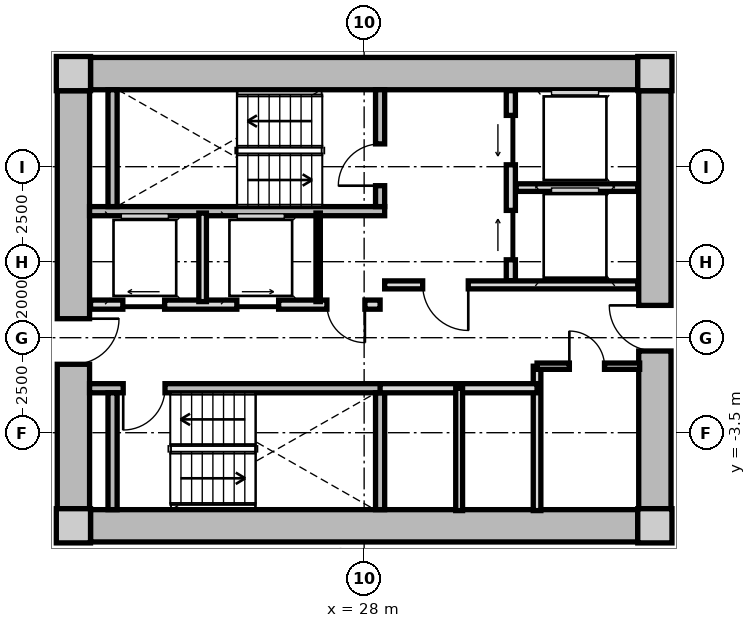
"""IFC4 building model, lengths in metres.
Left out: names, types, materials, properties, quantities, classifications, styles, units other than length and angle.
Written with IfcOpenShell. Run it as: python <this file> out.ifc"""

import sys

from ifc_helpers import new_model, si_unit, direction, frame, frame_2d, origin, origin_2d, place, context, subcontext, project, spatial, rectangle, extrude, source, transform, mapped, element, fill, save


model = new_model("IFC4")
c1 = context("Model", 3, precision=1e-05, world=origin(), true_north=direction((0.0, 1.0)))
c2 = subcontext(c1, "Body", "Model", "MODEL_VIEW")
j1 = project(units=[si_unit("LENGTHUNIT", "METRE"), si_unit("PLANEANGLEUNIT", "RADIAN")], contexts=[c1])
p1 = place(None, origin())
s1 = spatial("IfcSite", under=j1, at=p1, CompositionType="ELEMENT")
p2 = place(p1, origin())
s2 = spatial("IfcBuilding", under=s1, at=p2, CompositionType="ELEMENT")
p3 = place(p2, frame((0.0, 0.0, 24.65)))
s3 = spatial("IfcBuildingStorey", under=s2, at=p3, CompositionType="ELEMENT", Elevation=24.65)
m1 = source(origin(), c2, "Body", "SweptSolid", [
    extrude(rectangle(XDim=0.9, YDim=0.9, at=origin_2d()), origin(), (0.0, 0.0, 1.0), 3.05),
])
for number, where, z_axis, x_axis in (
    (1, (20.35, -5.95, 0.0), (0.0, 0.0, 1.0), (1.0, 0.0, 0.0)),
    (2, (35.65, -5.95, 0.0), (0.0, 0.0, 1.0), (1.0, 0.0, 0.0)),
    (3, (35.65, 5.95, 0.0), (0.0, 0.0, 1.0), (1.0, 0.0, 0.0)),
    (4, (20.35, 5.95, 0.0), (0.0, 0.0, 1.0), (1.0, 0.0, 0.0)),
):
    element("IfcColumn", number, at=place(p3, frame(where, z_axis=z_axis, x_axis=x_axis)), inside=s3, PredefinedType="COLUMN", context=c2, shape_type="MappedRepresentation", body=[
        mapped(m1, transform((0.0, 0.0, 0.0), x_axis=(1.0, 0.0, 0.0), y_axis=(0.0, 1.0, 0.0), z_axis=(0.0, 0.0, 1.0), scale=1.0)),
    ])
m2 = source(origin(), c2, "Body", "SweptSolid", [
    extrude(rectangle(XDim=14.4, YDim=0.85, at=frame_2d((7.2, 0.0))), origin(), (0.0, 0.0, 1.0), 2.79),
])
for number, where, z_axis, x_axis in (
    (5, (20.8, 5.95, 0.0), (0.0, 0.0, 1.0), (1.0, 0.0, 0.0)),
    (6, (35.2, -5.95, 0.0), (0.0, 0.0, 1.0), (-1.0, 0.0, 0.0)),
):
    element("IfcWall", number, at=place(p3, frame(where, z_axis=z_axis, x_axis=x_axis)), inside=s3, PredefinedType="SHEAR", context=c2, shape_type="MappedRepresentation", body=[
        mapped(m2, transform((0.0, 0.0, 0.0), x_axis=(1.0, 0.0, 0.0), y_axis=(0.0, 1.0, 0.0), z_axis=(0.0, 0.0, 1.0), scale=1.0)),
    ])
m3 = source(origin(), c2, "Body", "SweptSolid", [
    extrude(rectangle(XDim=11.0, YDim=0.85, at=frame_2d((5.5, 0.0))), origin(), (0.0, 0.0, 1.0), 2.79),
])
p4 = place(p3, frame((20.35, -5.5, 0.0), z_axis=(0.0, 0.0, 1.0), x_axis=(0.0, 1.0, 0.0)))
e7 = element("IfcWall", 7, at=p4, inside=s3, PredefinedType="SHEAR", context=c2, shape_type="MappedRepresentation", body=[
    mapped(m3, transform((0.0, 0.0, 0.0), x_axis=(1.0, 0.0, 0.0), y_axis=(0.0, 1.0, 0.0), z_axis=(0.0, 0.0, 1.0), scale=1.0)),
])
p5 = place(p4, frame((3.8, 0.0, 0.0)))
e8 = element("IfcOpeningElement", 8, at=p5, cuts=e7, PredefinedType="OPENING", context=c2, shape_type="SweptSolid", body=[
    extrude(rectangle(XDim=1.2, YDim=2.15, at=frame_2d((0.6, 1.075))), frame((0.0, 0.435, 0.0), z_axis=(0.0, -1.0, 0.0), x_axis=(1.0, 0.0, 0.0)), (0.0, 0.0, 1.0), 0.87),
])
p6 = place(p3, frame((35.65, 5.5, 0.0), z_axis=(0.0, 0.0, 1.0), x_axis=(0.0, -1.0, 0.0)))
e9 = element("IfcWall", 9, at=p6, inside=s3, PredefinedType="SHEAR", context=c2, shape_type="MappedRepresentation", body=[
    mapped(m3, transform((0.0, 0.0, 0.0), x_axis=(1.0, 0.0, 0.0), y_axis=(0.0, 1.0, 0.0), z_axis=(0.0, 0.0, 1.0), scale=1.0)),
])
p7 = place(p6, frame((5.65, 0.0, 0.0)))
e10 = element("IfcOpeningElement", 10, at=p7, cuts=e9, PredefinedType="OPENING", context=c2, shape_type="SweptSolid", body=[
    extrude(rectangle(XDim=1.2, YDim=2.15, at=frame_2d((0.6, 1.075))), frame((0.0, 0.435, 0.0), z_axis=(0.0, -1.0, 0.0), x_axis=(1.0, 0.0, 0.0)), (0.0, 0.0, 1.0), 0.87),
])
m4 = source(origin(), c2, "Body", "SweptSolid", [
    extrude(rectangle(XDim=7.765, YDim=0.24, at=frame_2d((3.883, 0.0))), origin(), (0.0, 0.0, 1.0), 2.79),
])
p8 = place(p3, frame((20.775, 2.33, 0.0), z_axis=(0.0, 0.0, 1.0), x_axis=(1.0, 0.0, 0.0)))
e11 = element("IfcWall", 11, at=p8, inside=s3, PredefinedType="PARTITIONING", context=c2, shape_type="MappedRepresentation", body=[
    mapped(m4, transform((0.0, 0.0, 0.0), x_axis=(1.0, 0.0, 0.0), y_axis=(0.0, 1.0, 0.0), z_axis=(0.0, 0.0, 1.0), scale=1.0)),
])
m5 = source(origin(), c2, "Body", "SweptSolid", [
    extrude(rectangle(XDim=3.075, YDim=0.24, at=frame_2d((1.538, 0.0))), origin(), (0.0, 0.0, 1.0), 2.79),
])
p9 = place(p3, frame((21.38, 2.45, 0.0), z_axis=(0.0, 0.0, 1.0), x_axis=(0.0, 1.0, 0.0)))
e12 = element("IfcWall", 12, at=p9, inside=s3, PredefinedType="PARTITIONING", context=c2, shape_type="MappedRepresentation", body=[
    mapped(m5, transform((0.0, 0.0, 0.0), x_axis=(1.0, 0.0, 0.0), y_axis=(0.0, 1.0, 0.0), z_axis=(0.0, 0.0, 1.0), scale=1.0)),
])
p10 = place(p3, frame((28.42, 2.45, 0.0), z_axis=(0.0, 0.0, 1.0), x_axis=(0.0, 1.0, 0.0)))
e13 = element("IfcWall", 13, at=p10, inside=s3, PredefinedType="PARTITIONING", context=c2, shape_type="MappedRepresentation", body=[
    mapped(m5, transform((0.0, 0.0, 0.0), x_axis=(1.0, 0.0, 0.0), y_axis=(0.0, 1.0, 0.0), z_axis=(0.0, 0.0, 1.0), scale=1.0)),
])
p11 = place(p10, frame((0.55, 0.0, 0.0)))
e14 = element("IfcOpeningElement", 14, at=p11, cuts=e13, PredefinedType="OPENING", context=c2, shape_type="SweptSolid", body=[
    extrude(rectangle(XDim=1.1, YDim=2.15, at=frame_2d((0.55, 1.075))), frame((0.0, 0.13, 0.0), z_axis=(0.0, -1.0, 0.0), x_axis=(1.0, 0.0, 0.0)), (0.0, 0.0, 1.0), 0.26),
])
p12 = place(p3, frame((20.775, -2.33, 0.0), z_axis=(0.0, 0.0, 1.0), x_axis=(1.0, 0.0, 0.0)))
e15 = element("IfcWall", 15, at=p12, inside=s3, PredefinedType="PARTITIONING", context=c2, shape_type="MappedRepresentation", body=[
    mapped(m4, transform((0.0, 0.0, 0.0), x_axis=(1.0, 0.0, 0.0), y_axis=(0.0, 1.0, 0.0), z_axis=(0.0, 0.0, 1.0), scale=1.0)),
])
p13 = place(p12, frame((0.885, 0.0, 0.0)))
e16 = element("IfcOpeningElement", 16, at=p13, cuts=e15, PredefinedType="OPENING", context=c2, shape_type="SweptSolid", body=[
    extrude(rectangle(XDim=1.1, YDim=2.15, at=frame_2d((0.55, 1.075))), frame((0.0, 0.13, 0.0), z_axis=(0.0, -1.0, 0.0), x_axis=(1.0, 0.0, 0.0)), (0.0, 0.0, 1.0), 0.26),
])
for number, where, z_axis, x_axis in (
    (17, (21.38, -5.525, 0.0), (0.0, 0.0, 1.0), (0.0, 1.0, 0.0)),
    (18, (28.42, -5.525, 0.0), (0.0, 0.0, 1.0), (0.0, 1.0, 0.0)),
):
    element("IfcWall", number, at=place(p3, frame(where, z_axis=z_axis, x_axis=x_axis)), inside=s3, PredefinedType="PARTITIONING", context=c2, shape_type="MappedRepresentation", body=[
        mapped(m5, transform((0.0, 0.0, 0.0), x_axis=(1.0, 0.0, 0.0), y_axis=(0.0, 1.0, 0.0), z_axis=(0.0, 0.0, 1.0), scale=1.0)),
    ])
m6 = source(origin(), c2, "Body", "SweptSolid", [
    extrude(rectangle(XDim=5.0, YDim=0.24, at=frame_2d((2.5, 0.0))), origin(), (0.0, 0.0, 1.0), 2.775),
])
p14 = place(p3, frame((31.86, 0.5, 0.0), z_axis=(0.0, 0.0, 1.0), x_axis=(0.0, 1.0, 0.0)))
e19 = element("IfcWall", 19, at=p14, inside=s3, PredefinedType="PARTITIONING", context=c2, shape_type="MappedRepresentation", body=[
    mapped(m6, transform((0.0, 0.0, 0.0), x_axis=(1.0, 0.0, 0.0), y_axis=(0.0, 1.0, 0.0), z_axis=(0.0, 0.0, 1.0), scale=1.0)),
])
p15 = place(p14, frame((3.05, 0.0, 0.0)))
e20 = element("IfcOpeningElement", 20, at=p15, cuts=e19, PredefinedType="OPENING", context=c2, shape_type="SweptSolid", body=[
    extrude(rectangle(XDim=1.3, YDim=2.2, at=frame_2d((0.65, 1.1))), frame((0.0, 0.13, 0.0), z_axis=(0.0, -1.0, 0.0), x_axis=(1.0, 0.0, 0.0)), (0.0, 0.0, 1.0), 0.26),
])
p16 = place(p14, frame((0.55, 0.0, 0.0)))
e21 = element("IfcOpeningElement", 21, at=p16, cuts=e19, PredefinedType="OPENING", context=c2, shape_type="SweptSolid", body=[
    extrude(rectangle(XDim=1.3, YDim=2.2, at=frame_2d((0.65, 1.1))), frame((0.0, 0.13, 0.0), z_axis=(0.0, -1.0, 0.0), x_axis=(1.0, 0.0, 0.0)), (0.0, 0.0, 1.0), 0.26),
])
m7 = source(origin(), c2, "Body", "SweptSolid", [
    extrude(rectangle(XDim=3.2, YDim=0.2, at=frame_2d((1.6, 0.0))), origin(), (0.0, 0.0, 1.0), 2.775),
])
p17 = place(p3, frame((32.0, 2.95, 0.0), z_axis=(0.0, 0.0, 1.0), x_axis=(1.0, 0.0, 0.0)))
e22 = element("IfcWall", 22, at=p17, inside=s3, PredefinedType="PARTITIONING", context=c2, shape_type="MappedRepresentation", body=[
    mapped(m7, transform((0.0, 0.0, 0.0), x_axis=(1.0, 0.0, 0.0), y_axis=(0.0, 1.0, 0.0), z_axis=(0.0, 0.0, 1.0), scale=1.0)),
])
m8 = source(origin(), c2, "Body", "SweptSolid", [
    extrude(rectangle(XDim=6.66, YDim=0.21, at=frame_2d((3.33, 0.0))), origin(), (0.0, 0.0, 1.0), 2.775),
])
p18 = place(p3, frame((28.54, 0.39, 0.0), z_axis=(0.0, 0.0, 1.0), x_axis=(1.0, 0.0, 0.0)))
e23 = element("IfcWall", 23, at=p18, inside=s3, PredefinedType="PARTITIONING", context=c2, shape_type="MappedRepresentation", body=[
    mapped(m8, transform((0.0, 0.0, 0.0), x_axis=(1.0, 0.0, 0.0), y_axis=(0.0, 1.0, 0.0), z_axis=(0.0, 0.0, 1.0), scale=1.0)),
])
p19 = place(p18, frame((1.0, 0.0, 0.0)))
e24 = element("IfcOpeningElement", 24, at=p19, cuts=e23, PredefinedType="OPENING", context=c2, shape_type="SweptSolid", body=[
    extrude(rectangle(XDim=1.2, YDim=2.15, at=frame_2d((0.6, 1.075))), frame((0.0, 0.115, 0.0), z_axis=(0.0, -1.0, 0.0), x_axis=(1.0, 0.0, 0.0)), (0.0, 0.0, 1.0), 0.23),
])
m9 = source(origin(), c2, "Body", "SweptSolid", [
    extrude(rectangle(XDim=7.62, YDim=0.24, at=frame_2d((3.81, 0.0))), origin(), (0.0, 0.0, 1.0), 2.775),
])
p20 = place(p3, frame((20.8, -0.13, 0.0), z_axis=(0.0, 0.0, 1.0), x_axis=(1.0, 0.0, 0.0)))
e25 = element("IfcWall", 25, at=p20, inside=s3, PredefinedType="PARTITIONING", context=c2, shape_type="MappedRepresentation", body=[
    mapped(m9, transform((0.0, 0.0, 0.0), x_axis=(1.0, 0.0, 0.0), y_axis=(0.0, 1.0, 0.0), z_axis=(0.0, 0.0, 1.0), scale=1.0)),
])
p21 = place(p20, frame((6.22, 0.0, 0.0)))
e26 = element("IfcOpeningElement", 26, at=p21, cuts=e25, PredefinedType="OPENING", context=c2, shape_type="SweptSolid", body=[
    extrude(rectangle(XDim=1.0, YDim=2.1, at=frame_2d((0.5, 1.05))), frame((0.0, 0.13, 0.0), z_axis=(0.0, -1.0, 0.0), x_axis=(1.0, 0.0, 0.0)), (0.0, 0.0, 1.0), 0.26),
])
p22 = place(p20, frame((0.85, 0.0, 0.0)))
e27 = element("IfcOpeningElement", 27, at=p22, cuts=e25, PredefinedType="OPENING", context=c2, shape_type="SweptSolid", body=[
    extrude(rectangle(XDim=1.1, YDim=2.2, at=frame_2d((0.55, 1.1))), frame((0.0, 0.13, 0.0), z_axis=(0.0, -1.0, 0.0), x_axis=(1.0, 0.0, 0.0)), (0.0, 0.0, 1.0), 0.26),
])
p23 = place(p20, frame((3.85, 0.0, 0.0)))
e28 = element("IfcOpeningElement", 28, at=p23, cuts=e25, PredefinedType="OPENING", context=c2, shape_type="SweptSolid", body=[
    extrude(rectangle(XDim=1.1, YDim=2.2, at=frame_2d((0.55, 1.1))), frame((0.0, 0.13, 0.0), z_axis=(0.0, -1.0, 0.0), x_axis=(1.0, 0.0, 0.0)), (0.0, 0.0, 1.0), 0.26),
])
m10 = source(origin(), c2, "Body", "SweptSolid", [
    extrude(rectangle(XDim=2.33, YDim=0.115, at=frame_2d((1.165, 0.0))), origin(), (0.0, 0.0, 1.0), 2.775),
])
p24 = place(p3, frame((26.79, -0.05, 0.0), z_axis=(0.0, 0.0, 1.0), x_axis=(0.0, 1.0, 0.0)))
e29 = element("IfcWall", 29, at=p24, inside=s3, PredefinedType="PARTITIONING", context=c2, shape_type="MappedRepresentation", body=[
    mapped(m10, transform((0.0, 0.0, 0.0), x_axis=(1.0, 0.0, 0.0), y_axis=(0.0, 1.0, 0.0), z_axis=(0.0, 0.0, 1.0), scale=1.0)),
])
m11 = source(origin(), c2, "Body", "SweptSolid", [
    extrude(rectangle(XDim=2.33, YDim=0.2, at=frame_2d((1.165, 0.0))), origin(), (0.0, 0.0, 1.0), 2.775),
])
p25 = place(p3, frame((23.75, -0.05, 0.0), z_axis=(0.0, 0.0, 1.0), x_axis=(0.0, 1.0, 0.0)))
e30 = element("IfcWall", 30, at=p25, inside=s3, PredefinedType="PARTITIONING", context=c2, shape_type="MappedRepresentation", body=[
    mapped(m11, transform((0.0, 0.0, 0.0), x_axis=(1.0, 0.0, 0.0), y_axis=(0.0, 1.0, 0.0), z_axis=(0.0, 0.0, 1.0), scale=1.0)),
])
m12 = source(origin(), c2, "Body", "SweptSolid", [
    extrude(rectangle(XDim=3.8, YDim=0.2, at=frame_2d((1.9, 0.0))), origin(), (0.0, 0.0, 1.0), 2.775),
])
p26 = place(p3, frame((32.55, -5.55, 0.0), z_axis=(0.0, 0.0, 1.0), x_axis=(0.0, 1.0, 0.0)))
e31 = element("IfcWall", 31, at=p26, inside=s3, PredefinedType="PARTITIONING", context=c2, shape_type="MappedRepresentation", body=[
    mapped(m12, transform((0.0, 0.0, 0.0), x_axis=(1.0, 0.0, 0.0), y_axis=(0.0, 1.0, 0.0), z_axis=(0.0, 0.0, 1.0), scale=1.0)),
])
m13 = source(origin(), c2, "Body", "SweptSolid", [
    extrude(rectangle(XDim=4.13, YDim=0.24, at=frame_2d((2.065, 0.0))), origin(), (0.0, 0.0, 1.0), 2.775),
])
p27 = place(p3, frame((28.42, -2.33, 0.0), z_axis=(0.0, 0.0, 1.0), x_axis=(1.0, 0.0, 0.0)))
e32 = element("IfcWall", 32, at=p27, inside=s3, PredefinedType="PARTITIONING", context=c2, shape_type="MappedRepresentation", body=[
    mapped(m13, transform((0.0, 0.0, 0.0), x_axis=(1.0, 0.0, 0.0), y_axis=(0.0, 1.0, 0.0), z_axis=(0.0, 0.0, 1.0), scale=1.0)),
])
m14 = source(origin(), c2, "Body", "SweptSolid", [
    extrude(rectangle(XDim=3.22, YDim=0.18, at=frame_2d((1.61, 0.0))), origin(), (0.0, 0.0, 1.0), 2.775),
])
p28 = place(p3, frame((30.5, -5.55, 0.0), z_axis=(0.0, 0.0, 1.0), x_axis=(0.0, 1.0, 0.0)))
e33 = element("IfcWall", 33, at=p28, inside=s3, PredefinedType="PARTITIONING", context=c2, shape_type="MappedRepresentation", body=[
    mapped(m14, transform((0.0, 0.0, 0.0), x_axis=(1.0, 0.0, 0.0), y_axis=(0.0, 1.0, 0.0), z_axis=(0.0, 0.0, 1.0), scale=1.0)),
])
m15 = source(origin(), c2, "Body", "SweptSolid", [
    extrude(rectangle(XDim=2.7, YDim=0.165, at=frame_2d((1.35, 0.0))), origin(), (0.0, 0.0, 1.0), 2.775),
])
p29 = place(p3, frame((32.55, -1.75, 0.0), z_axis=(0.0, 0.0, 1.0), x_axis=(1.0, 0.0, 0.0)))
e34 = element("IfcWall", 34, at=p29, inside=s3, PredefinedType="PARTITIONING", context=c2, shape_type="MappedRepresentation", body=[
    mapped(m15, transform((0.0, 0.0, 0.0), x_axis=(1.0, 0.0, 0.0), y_axis=(0.0, 1.0, 0.0), z_axis=(0.0, 0.0, 1.0), scale=1.0)),
])
p30 = place(p29, frame((0.85, 0.0, 0.0)))
e35 = element("IfcOpeningElement", 35, at=p30, cuts=e34, PredefinedType="OPENING", context=c2, shape_type="SweptSolid", body=[
    extrude(rectangle(XDim=0.925, YDim=2.1, at=frame_2d((0.462, 1.05))), frame((0.0, 0.093, 0.0), z_axis=(0.0, -1.0, 0.0), x_axis=(1.0, 0.0, 0.0)), (0.0, 0.0, 1.0), 0.185),
])
m16 = source(origin(), c2, "Body", "SweptSolid", [
    extrude(rectangle(XDim=1.1, YDim=2.15, at=frame_2d((0.55, 1.075))), frame((0.0, 0.025, 0.0), z_axis=(0.0, -1.0, 0.0), x_axis=(1.0, 0.0, 0.0)), (0.0, 0.0, 1.0), 0.05),
])
p31 = place(p11, origin())
e36 = element("IfcDoor", 36, at=p31, inside=s3, OperationType="SINGLE_SWING_LEFT", PredefinedType="DOOR", context=c2, shape_type="MappedRepresentation", body=[
    mapped(m16, transform((0.0, 0.0, 0.0), x_axis=(1.0, 0.0, 0.0), y_axis=(0.0, 1.0, 0.0), z_axis=(0.0, 0.0, 1.0), scale=1.0)),
])
fill(e14, e36)
p32 = place(p13, frame((1.1, 0.0, 0.0), z_axis=(0.0, 0.0, 1.0), x_axis=(-1.0, 0.0, 0.0)))
e37 = element("IfcDoor", 37, at=p32, inside=s3, OperationType="SINGLE_SWING_RIGHT", PredefinedType="DOOR", context=c2, shape_type="MappedRepresentation", body=[
    mapped(m16, transform((0.0, 0.0, 0.0), x_axis=(1.0, 0.0, 0.0), y_axis=(0.0, 1.0, 0.0), z_axis=(0.0, 0.0, 1.0), scale=1.0)),
])
fill(e16, e37)
m17 = source(origin(), c2, "Body", "SweptSolid", [
    extrude(rectangle(XDim=1.3, YDim=2.2, at=frame_2d((0.65, 1.1))), frame((0.0, 0.025, 0.0), z_axis=(0.0, -1.0, 0.0), x_axis=(1.0, 0.0, 0.0)), (0.0, 0.0, 1.0), 0.05),
])
p33 = place(p15, origin())
e38 = element("IfcDoor", 38, at=p33, inside=s3, OperationType="SLIDING_TO_LEFT", PredefinedType="DOOR", context=c2, shape_type="MappedRepresentation", body=[
    mapped(m17, transform((0.0, 0.0, 0.0), x_axis=(1.0, 0.0, 0.0), y_axis=(0.0, 1.0, 0.0), z_axis=(0.0, 0.0, 1.0), scale=1.0)),
])
fill(e20, e38)
p34 = place(p16, origin())
e39 = element("IfcDoor", 39, at=p34, inside=s3, OperationType="SLIDING_TO_RIGHT", PredefinedType="DOOR", context=c2, shape_type="MappedRepresentation", body=[
    mapped(m17, transform((0.0, 0.0, 0.0), x_axis=(1.0, 0.0, 0.0), y_axis=(0.0, 1.0, 0.0), z_axis=(0.0, 0.0, 1.0), scale=1.0)),
])
fill(e21, e39)
m18 = source(origin(), c2, "Body", "SweptSolid", [
    extrude(rectangle(XDim=1.2, YDim=2.15, at=frame_2d((0.6, 1.075))), frame((0.0, 0.025, 0.0), z_axis=(0.0, -1.0, 0.0), x_axis=(1.0, 0.0, 0.0)), (0.0, 0.0, 1.0), 0.05),
])
p35 = place(p19, frame((1.2, 0.0, 0.0), z_axis=(0.0, 0.0, 1.0), x_axis=(-1.0, 0.0, 0.0)))
e40 = element("IfcDoor", 40, at=p35, inside=s3, OperationType="SINGLE_SWING_LEFT", PredefinedType="DOOR", context=c2, shape_type="MappedRepresentation", body=[
    mapped(m18, transform((0.0, 0.0, 0.0), x_axis=(1.0, 0.0, 0.0), y_axis=(0.0, 1.0, 0.0), z_axis=(0.0, 0.0, 1.0), scale=1.0)),
])
fill(e24, e40)
p36 = place(p5, frame((1.2, 0.0, 0.0), z_axis=(0.0, 0.0, 1.0), x_axis=(-1.0, 0.0, 0.0)))
e41 = element("IfcDoor", 41, at=p36, inside=s3, OperationType="SINGLE_SWING_LEFT", PredefinedType="DOOR", context=c2, shape_type="MappedRepresentation", body=[
    mapped(m18, transform((0.0, 0.0, 0.0), x_axis=(1.0, 0.0, 0.0), y_axis=(0.0, 1.0, 0.0), z_axis=(0.0, 0.0, 1.0), scale=1.0)),
])
fill(e8, e41)
p37 = place(p7, frame((1.2, 0.0, 0.0), z_axis=(0.0, 0.0, 1.0), x_axis=(-1.0, 0.0, 0.0)))
e42 = element("IfcDoor", 42, at=p37, inside=s3, OperationType="SINGLE_SWING_RIGHT", PredefinedType="DOOR", context=c2, shape_type="MappedRepresentation", body=[
    mapped(m18, transform((0.0, 0.0, 0.0), x_axis=(1.0, 0.0, 0.0), y_axis=(0.0, 1.0, 0.0), z_axis=(0.0, 0.0, 1.0), scale=1.0)),
])
fill(e10, e42)
m19 = source(origin(), c2, "Body", "SweptSolid", [
    extrude(rectangle(XDim=1.0, YDim=2.1, at=frame_2d((0.5, 1.05))), frame((0.0, 0.025, 0.0), z_axis=(0.0, -1.0, 0.0), x_axis=(1.0, 0.0, 0.0)), (0.0, 0.0, 1.0), 0.05),
])
p38 = place(p21, frame((1.0, 0.0, 0.0), z_axis=(0.0, 0.0, 1.0), x_axis=(-1.0, 0.0, 0.0)))
e43 = element("IfcDoor", 43, at=p38, inside=s3, OperationType="SINGLE_SWING_LEFT", PredefinedType="DOOR", context=c2, shape_type="MappedRepresentation", body=[
    mapped(m19, transform((0.0, 0.0, 0.0), x_axis=(1.0, 0.0, 0.0), y_axis=(0.0, 1.0, 0.0), z_axis=(0.0, 0.0, 1.0), scale=1.0)),
])
fill(e26, e43)
m20 = source(origin(), c2, "Body", "SweptSolid", [
    extrude(rectangle(XDim=1.1, YDim=2.2, at=frame_2d((0.55, 1.1))), frame((0.0, 0.025, 0.0), z_axis=(0.0, -1.0, 0.0), x_axis=(1.0, 0.0, 0.0)), (0.0, 0.0, 1.0), 0.05),
])
p39 = place(p22, origin())
e44 = element("IfcDoor", 44, at=p39, inside=s3, OperationType="SLIDING_TO_LEFT", PredefinedType="DOOR", context=c2, shape_type="MappedRepresentation", body=[
    mapped(m20, transform((0.0, 0.0, 0.0), x_axis=(1.0, 0.0, 0.0), y_axis=(0.0, 1.0, 0.0), z_axis=(0.0, 0.0, 1.0), scale=1.0)),
])
fill(e27, e44)
p40 = place(p23, origin())
e45 = element("IfcDoor", 45, at=p40, inside=s3, OperationType="SLIDING_TO_RIGHT", PredefinedType="DOOR", context=c2, shape_type="MappedRepresentation", body=[
    mapped(m20, transform((0.0, 0.0, 0.0), x_axis=(1.0, 0.0, 0.0), y_axis=(0.0, 1.0, 0.0), z_axis=(0.0, 0.0, 1.0), scale=1.0)),
])
fill(e28, e45)
m21 = source(origin(), c2, "Body", "SweptSolid", [
    extrude(rectangle(XDim=0.925, YDim=2.1, at=frame_2d((0.462, 1.05))), frame((0.0, 0.025, 0.0), z_axis=(0.0, -1.0, 0.0), x_axis=(1.0, 0.0, 0.0)), (0.0, 0.0, 1.0), 0.05),
])
p41 = place(p30, origin())
e46 = element("IfcDoor", 46, at=p41, inside=s3, OperationType="SINGLE_SWING_LEFT", PredefinedType="DOOR", context=c2, shape_type="MappedRepresentation", body=[
    mapped(m21, transform((0.0, 0.0, 0.0), x_axis=(1.0, 0.0, 0.0), y_axis=(0.0, 1.0, 0.0), z_axis=(0.0, 0.0, 1.0), scale=1.0)),
])
fill(e35, e46)
save(model, sys.argv[1])
